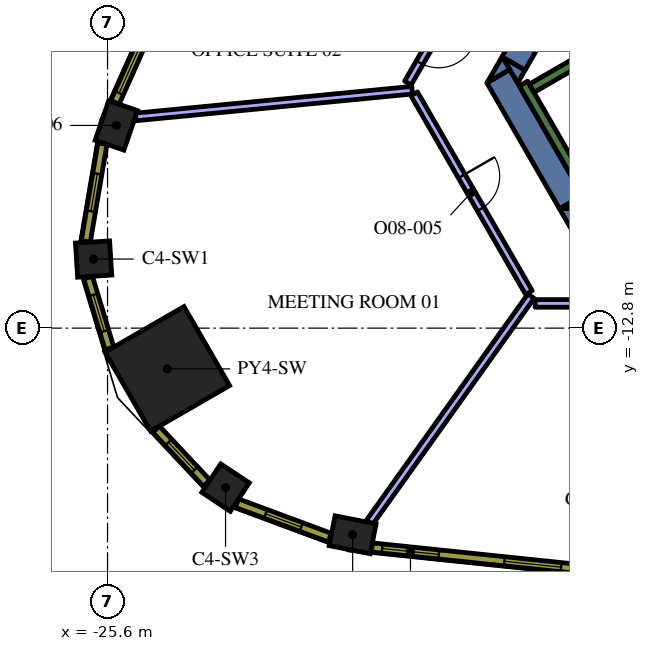
"""IFC4 building model, lengths in metres.
Left out: names, types, materials, properties, quantities, classifications, styles, units other than length and angle.
Written with IfcOpenShell. Run it as: python <this file> out.ifc"""

import sys

from ifc_helpers import new_model, si_unit, direction, frame, frame_2d, origin, origin_2d, place, context, subcontext, project, spatial, polyline, rectangle, outline, extrude, element, fill, save


model = new_model("IFC4")
c1 = context("Model", 3, precision=1e-05, world=origin(), true_north=direction((0.0, 1.0)))
c2 = subcontext(c1, "Body", "Model", "MODEL_VIEW")
j1 = project(units=[si_unit("LENGTHUNIT", "METRE"), si_unit("PLANEANGLEUNIT", "RADIAN")], contexts=[c1])
p1 = place(None, origin())
s1 = spatial("IfcSite", under=j1, at=p1, CompositionType="ELEMENT")
p2 = place(p1, origin())
s2 = spatial("IfcBuilding", under=s1, at=p2, CompositionType="ELEMENT")
p3 = place(p2, frame((0.0, 0.0, 226.8)))
s3 = spatial("IfcBuildingStorey", under=s2, at=p3, CompositionType="ELEMENT", Elevation=226.8)
p4 = place(p3, frame((-24.027, -13.872, 0.0), z_axis=(0.0, 0.0, 1.0), x_axis=(-0.866025403784, -0.5, 0.0)))
e1 = element("IfcColumn", 1, at=p4, inside=s3, PredefinedType="COLUMN", context=c2, shape_type="SweptSolid", body=[
    extrude(rectangle(XDim=2.4, YDim=2.4, at=origin_2d()), origin(), (0.0, 0.0, 1.0), 4.2),
])
for number, where, z_axis, x_axis in (
    (2, (-19.15, -18.237, 0.0), (0.0, 0.0, 1.0), (0.981, -0.192, 0.0)),
    (3, (-25.369, -7.466, 0.0), (0.0, 0.0, 1.0), (-0.324, -0.946, 0.0)),
):
    element("IfcColumn", number, at=place(p3, frame(where, z_axis=z_axis, x_axis=x_axis)), inside=s3, PredefinedType="COLUMN", context=c2, shape_type="SweptSolid", body=[
        extrude(rectangle(XDim=1.1, YDim=0.8, at=origin_2d()), origin(), (0.0, 0.0, 1.0), 4.2),
    ])
for number, where, z_axis, x_axis in (
    (4, (-25.967, -10.982, 0.0), (0.0, 0.0, 1.0), (0.062, -0.998, 0.0)),
    (5, (-22.494, -16.997, 0.0), (0.0, 0.0, 1.0), (0.833, -0.553, 0.0)),
):
    element("IfcColumn", number, at=place(p3, frame(where, z_axis=z_axis, x_axis=x_axis)), inside=s3, PredefinedType="COLUMN", context=c2, shape_type="SweptSolid", body=[
        extrude(rectangle(XDim=0.9, YDim=0.9, at=origin_2d()), origin(), (0.0, 0.0, 1.0), 4.2),
    ])
p5 = place(p3, origin())
e6 = element("IfcWall", 6, at=p5, inside=s3, PredefinedType="SOLIDWALL", context=c2, shape_type="SweptSolid", body=[
    extrude(outline(polyline([(-13.712, -9.65), (-13.324, -9.65), (-13.324, -10.322), (-13.712, -9.65)])), origin(), (0.0, 0.0, 1.0), 4.2),
])
p6 = place(p3, frame((-13.402, -9.487, 0.0), z_axis=(0.0, 0.0, 1.0), x_axis=(-0.500020498207, 0.866013568815, 0.0)))
e7 = element("IfcWall", 7, at=p6, inside=s3, PredefinedType="SOLIDWALL", context=c2, shape_type="SweptSolid", body=[
    extrude(rectangle(XDim=3.829, YDim=0.7, at=frame_2d((1.915, 0.0))), origin(), (0.0, 0.0, 1.0), 4.2),
])
e8 = element("IfcWall", 8, at=p5, inside=s3, PredefinedType="SOLIDWALL", context=c2, shape_type="SweptSolid", body=[
    extrude(outline(polyline([(-15.014, -5.995), (-15.611, -6.339), (-15.213, -5.65), (-15.014, -5.995)])), origin(), (0.0, 0.0, 1.0), 4.2),
])
e9 = element("IfcWall", 9, at=p5, inside=s3, PredefinedType="SOLIDWALL", context=c2, shape_type="SweptSolid", body=[
    extrude(outline(polyline([(-12.904, -9.65), (-13.68, -9.65), (-13.098, -9.314), (-12.904, -9.65)])), origin(), (0.0, 0.0, 1.0), 4.2),
])
p7 = place(p3, frame((-13.475, -3.339, 0.0), z_axis=(0.0, 0.0, 1.0), x_axis=(-0.499944726303, -0.866057313716, 0.0)))
e10 = element("IfcWall", 10, at=p7, inside=s3, PredefinedType="SOLIDWALL", context=c2, shape_type="SweptSolid", body=[
    extrude(rectangle(XDim=2.884, YDim=0.7, at=frame_2d((1.442, 0.0))), origin(), (0.0, 0.0, 1.0), 4.2),
])
e11 = element("IfcWall", 11, at=p5, inside=s3, PredefinedType="SOLIDWALL", context=c2, shape_type="SweptSolid", body=[
    extrude(outline(polyline([(-14.809, -6.35), (-15.197, -5.678), (-14.615, -6.014), (-14.809, -6.35)])), origin(), (0.0, 0.0, 1.0), 4.2),
])
p8 = place(p3, frame((-12.84, -9.511, 0.0), z_axis=(0.0, 0.0, 1.0), x_axis=(-0.499997733992, 0.866026712061, 0.0)))
e12 = element("IfcWall", 12, at=p8, inside=s3, PredefinedType="SOLIDWALL", context=c2, shape_type="SweptSolid", body=[
    extrude(rectangle(XDim=3.634, YDim=0.25, at=frame_2d((1.817, 0.0))), origin(), (0.0, 0.0, 1.0), 4.2),
])
p9 = place(p3, frame((-14.44, -6.49, 0.0), z_axis=(0.0, 0.0, 1.0), x_axis=(0.866022966069, 0.500004222222, 0.0)))
e13 = element("IfcWall", 13, at=p9, inside=s3, PredefinedType="SOLIDWALL", context=c2, shape_type="SweptSolid", body=[
    extrude(rectangle(XDim=6.8, YDim=0.25, at=frame_2d((3.4, 0.0))), origin(), (0.0, 0.0, 1.0), 4.2),
])
p10 = place(p3, frame((-17.586, -6.54, 0.0), z_axis=(0.0, 0.0, 1.0), x_axis=(-0.995357542522, -0.096246363795, 0.0)))
e14 = element("IfcWall", 14, at=p10, inside=s3, PredefinedType="PARTITIONING", context=c2, shape_type="SweptSolid", body=[
    extrude(rectangle(XDim=7.318, YDim=0.2, at=frame_2d((3.659, 0.0))), origin(), (0.0, 0.0, 1.0), 3.45),
])
p11 = place(p3, frame((-16.537, -4.343, 0.0), z_axis=(0.0, 0.0, 1.0), x_axis=(-0.500014285048, -0.866017156151, 0.0)))
e15 = element("IfcWall", 15, at=p11, inside=s3, PredefinedType="PARTITIONING", context=c2, shape_type="SweptSolid", body=[
    extrude(rectangle(XDim=2.317, YDim=0.2, at=frame_2d((1.159, 0.0))), origin(), (0.0, 0.0, 1.0), 3.45),
])
p12 = place(p11, frame((0.7, 0.0, 0.0)))
e16 = element("IfcOpeningElement", 16, at=p12, cuts=e15, PredefinedType="OPENING", context=c2, shape_type="SweptSolid", body=[
    extrude(rectangle(XDim=1.0, YDim=2.1, at=frame_2d((0.5, 1.05))), frame((0.0, 0.11, 0.0), z_axis=(0.0, -1.0, 0.0), x_axis=(1.0, 0.0, 0.0)), (0.0, 0.0, 1.0), 0.22),
])
p13 = place(p3, frame((-14.457, -11.96, 0.0), z_axis=(0.0, 0.0, 1.0), x_axis=(-0.581023578026, -0.813886725397, 0.0)))
e17 = element("IfcWall", 17, at=p13, inside=s3, PredefinedType="PARTITIONING", context=c2, shape_type="SweptSolid", body=[
    extrude(rectangle(XDim=7.318, YDim=0.2, at=frame_2d((3.659, 0.0))), origin(), (0.0, 0.0, 1.0), 3.45),
])
p14 = place(p3, frame((-17.531, -6.635, 0.0), z_axis=(0.0, 0.0, 1.0), x_axis=(0.500009459589, -0.866019942219, 0.0)))
e18 = element("IfcWall", 18, at=p14, inside=s3, PredefinedType="PARTITIONING", context=c2, shape_type="SweptSolid", body=[
    extrude(rectangle(XDim=6.038, YDim=0.2, at=frame_2d((3.019, 0.0))), origin(), (0.0, 0.0, 1.0), 3.45),
])
p15 = place(p14, frame((2.5, 0.0, 0.0)))
e19 = element("IfcOpeningElement", 19, at=p15, cuts=e18, PredefinedType="OPENING", context=c2, shape_type="SweptSolid", body=[
    extrude(rectangle(XDim=1.0, YDim=2.1, at=frame_2d((0.5, 1.05))), frame((0.0, 0.11, 0.0), z_axis=(0.0, -1.0, 0.0), x_axis=(1.0, 0.0, 0.0)), (0.0, 0.0, 1.0), 0.22),
])
p16 = place(p3, frame((-14.347, -12.15, 0.0), z_axis=(0.0, 0.0, 1.0), x_axis=(1.0, 0.0, 0.0)))
e20 = element("IfcWall", 20, at=p16, inside=s3, PredefinedType="PARTITIONING", context=c2, shape_type="SweptSolid", body=[
    extrude(rectangle(XDim=9.817, YDim=0.2, at=frame_2d((4.909, 0.0))), origin(), (0.0, 0.0, 1.0), 3.45),
])
p17 = place(p16, frame((4.4, 0.0, 0.0)))
e21 = element("IfcOpeningElement", 21, at=p17, cuts=e20, PredefinedType="OPENING", context=c2, shape_type="SweptSolid", body=[
    extrude(rectangle(XDim=1.0, YDim=2.1, at=frame_2d((0.5, 1.05))), frame((0.0, 0.11, 0.0), z_axis=(0.0, -1.0, 0.0), x_axis=(1.0, 0.0, 0.0)), (0.0, 0.0, 1.0), 0.22),
])
p18 = place(p3, frame((-18.644, -18.571, 0.0), z_axis=(0.0, 0.0, 1.0), x_axis=(0.994621961215, -0.103571976272, 0.0)))
e22 = element("IfcWall", 22, at=p18, inside=s3, PredefinedType="SOLIDWALL", context=c2, shape_type="SweptSolid", body=[
    extrude(rectangle(XDim=5.311, YDim=0.24, at=frame_2d((2.655, 0.0))), origin(), (0.0, 0.0, 1.0), 3.95),
])
p19 = place(p18, frame((0.271, 0.0, 0.9)))
e23 = element("IfcOpeningElement", 23, at=p19, cuts=e22, PredefinedType="OPENING", context=c2, shape_type="SweptSolid", body=[
    extrude(rectangle(XDim=1.5, YDim=2.55, at=frame_2d((0.75, 1.275))), frame((0.0, 0.13, 0.0), z_axis=(0.0, -1.0, 0.0), x_axis=(1.0, 0.0, 0.0)), (0.0, 0.0, 1.0), 0.26),
])
p20 = place(p18, frame((3.504, 0.0, 0.9)))
e24 = element("IfcOpeningElement", 24, at=p20, cuts=e22, PredefinedType="OPENING", context=c2, shape_type="SweptSolid", body=[
    extrude(rectangle(XDim=1.5, YDim=2.55, at=frame_2d((0.75, 1.275))), frame((0.0, 0.13, 0.0), z_axis=(0.0, -1.0, 0.0), x_axis=(1.0, 0.0, 0.0)), (0.0, 0.0, 1.0), 0.26),
])
p21 = place(p3, frame((-23.24, -2.011, 0.0), z_axis=(0.0, 0.0, 1.0), x_axis=(-0.407579651789, -0.913169659728, 0.0)))
e25 = element("IfcWall", 25, at=p21, inside=s3, PredefinedType="SOLIDWALL", context=c2, shape_type="SweptSolid", body=[
    extrude(rectangle(XDim=5.311, YDim=0.24, at=frame_2d((2.655, 0.0))), origin(), (0.0, 0.0, 1.0), 3.95),
])
p22 = place(p21, frame((0.306, 0.0, 0.9)))
e26 = element("IfcOpeningElement", 26, at=p22, cuts=e25, PredefinedType="OPENING", context=c2, shape_type="SweptSolid", body=[
    extrude(rectangle(XDim=1.5, YDim=2.55, at=frame_2d((0.75, 1.275))), frame((0.0, 0.13, 0.0), z_axis=(0.0, -1.0, 0.0), x_axis=(1.0, 0.0, 0.0)), (0.0, 0.0, 1.0), 0.26),
])
p23 = place(p21, frame((3.539, 0.0, 0.9)))
e27 = element("IfcOpeningElement", 27, at=p23, cuts=e25, PredefinedType="OPENING", context=c2, shape_type="SweptSolid", body=[
    extrude(rectangle(XDim=1.5, YDim=2.55, at=frame_2d((0.75, 1.275))), frame((0.0, 0.13, 0.0), z_axis=(0.0, -1.0, 0.0), x_axis=(1.0, 0.0, 0.0)), (0.0, 0.0, 1.0), 0.26),
])
p24 = place(p3, frame((-25.734, -7.945, 0.0), z_axis=(0.0, 0.0, 1.0), x_axis=(-0.167660055546, -0.985844869021, 0.0)))
e28 = element("IfcWall", 28, at=p24, inside=s3, PredefinedType="SOLIDWALL", context=c2, shape_type="SweptSolid", body=[
    extrude(rectangle(XDim=2.609, YDim=0.24, at=frame_2d((1.305, 0.0))), origin(), (0.0, 0.0, 1.0), 3.95),
])
p25 = place(p24, frame((0.805, 0.0, 0.9)))
e29 = element("IfcOpeningElement", 29, at=p25, cuts=e28, PredefinedType="OPENING", context=c2, shape_type="SweptSolid", body=[
    extrude(rectangle(XDim=1.0, YDim=2.55, at=frame_2d((0.5, 1.275))), frame((0.0, 0.13, 0.0), z_axis=(0.0, -1.0, 0.0), x_axis=(1.0, 0.0, 0.0)), (0.0, 0.0, 1.0), 0.26),
])
p26 = place(p3, frame((-26.112, -11.469, 0.0), z_axis=(0.0, 0.0, 1.0), x_axis=(0.288727209095, -0.957411405159, 0.0)))
e30 = element("IfcWall", 30, at=p26, inside=s3, PredefinedType="SOLIDWALL", context=c2, shape_type="SweptSolid", body=[
    extrude(rectangle(XDim=1.948, YDim=0.24, at=frame_2d((0.974, 0.0))), origin(), (0.0, 0.0, 1.0), 3.95),
])
p27 = place(p26, frame((0.474, 0.0, 0.9)))
e31 = element("IfcOpeningElement", 31, at=p27, cuts=e30, PredefinedType="OPENING", context=c2, shape_type="SweptSolid", body=[
    extrude(rectangle(XDim=1.0, YDim=2.55, at=frame_2d((0.5, 1.275))), frame((0.0, 0.13, 0.0), z_axis=(0.0, -1.0, 0.0), x_axis=(1.0, 0.0, 0.0)), (0.0, 0.0, 1.0), 0.26),
])
p28 = place(p3, frame((-24.323, -15.459, 0.0), z_axis=(0.0, 0.0, 1.0), x_axis=(0.684770274166, -0.728758994194, 0.0)))
e32 = element("IfcWall", 32, at=p28, inside=s3, PredefinedType="SOLIDWALL", context=c2, shape_type="SweptSolid", body=[
    extrude(rectangle(XDim=1.948, YDim=0.24, at=frame_2d((0.974, 0.0))), origin(), (0.0, 0.0, 1.0), 3.95),
])
p29 = place(p28, frame((0.474, 0.0, 0.9)))
e33 = element("IfcOpeningElement", 33, at=p29, cuts=e32, PredefinedType="OPENING", context=c2, shape_type="SweptSolid", body=[
    extrude(rectangle(XDim=1.0, YDim=2.55, at=frame_2d((0.5, 1.275))), frame((0.0, 0.13, 0.0), z_axis=(0.0, -1.0, 0.0), x_axis=(1.0, 0.0, 0.0)), (0.0, 0.0, 1.0), 0.26),
])
p30 = place(p3, frame((-22.194, -17.406, 0.0), z_axis=(0.0, 0.0, 1.0), x_axis=(0.937569171184, -0.347798863203, 0.0)))
e34 = element("IfcWall", 34, at=p30, inside=s3, PredefinedType="SOLIDWALL", context=c2, shape_type="SweptSolid", body=[
    extrude(rectangle(XDim=2.609, YDim=0.24, at=frame_2d((1.305, 0.0))), origin(), (0.0, 0.0, 1.0), 3.95),
])
p31 = place(p30, frame((0.805, 0.0, 0.9)))
e35 = element("IfcOpeningElement", 35, at=p31, cuts=e34, PredefinedType="OPENING", context=c2, shape_type="SweptSolid", body=[
    extrude(rectangle(XDim=1.0, YDim=2.55, at=frame_2d((0.5, 1.275))), frame((0.0, 0.13, 0.0), z_axis=(0.0, -1.0, 0.0), x_axis=(1.0, 0.0, 0.0)), (0.0, 0.0, 1.0), 0.26),
])
p32 = place(p12, origin())
e36 = element("IfcDoor", 36, at=p32, inside=s3, OperationType="SINGLE_SWING_RIGHT", PredefinedType="DOOR", context=c2, shape_type="SweptSolid", body=[
    extrude(rectangle(XDim=1.0, YDim=2.1, at=frame_2d((0.5, 1.05))), frame((0.0, 0.025, 0.0), z_axis=(0.0, -1.0, 0.0), x_axis=(1.0, 0.0, 0.0)), (0.0, 0.0, 1.0), 0.05),
])
fill(e16, e36)
p33 = place(p15, origin())
e37 = element("IfcDoor", 37, at=p33, inside=s3, OperationType="SINGLE_SWING_LEFT", PredefinedType="DOOR", context=c2, shape_type="SweptSolid", body=[
    extrude(rectangle(XDim=1.0, YDim=2.1, at=frame_2d((0.5, 1.05))), frame((0.0, 0.025, 0.0), z_axis=(0.0, -1.0, 0.0), x_axis=(1.0, 0.0, 0.0)), (0.0, 0.0, 1.0), 0.05),
])
fill(e19, e37)
p34 = place(p19, origin())
e38 = element("IfcWindow", 38, at=p34, inside=s3, PartitioningType="SINGLE_PANEL", PredefinedType="WINDOW", context=c2, shape_type="SweptSolid", body=[
    extrude(rectangle(XDim=1.5, YDim=2.55, at=frame_2d((0.75, 1.275))), frame((0.0, 0.04, 0.0), z_axis=(0.0, -1.0, 0.0), x_axis=(1.0, 0.0, 0.0)), (0.0, 0.0, 1.0), 0.06),
])
fill(e23, e38)
p35 = place(p20, origin())
e39 = element("IfcWindow", 39, at=p35, inside=s3, PartitioningType="SINGLE_PANEL", PredefinedType="WINDOW", context=c2, shape_type="SweptSolid", body=[
    extrude(rectangle(XDim=1.5, YDim=2.55, at=frame_2d((0.75, 1.275))), frame((0.0, 0.04, 0.0), z_axis=(0.0, -1.0, 0.0), x_axis=(1.0, 0.0, 0.0)), (0.0, 0.0, 1.0), 0.06),
])
fill(e24, e39)
p36 = place(p23, origin())
e40 = element("IfcWindow", 40, at=p36, inside=s3, PartitioningType="SINGLE_PANEL", PredefinedType="WINDOW", context=c2, shape_type="SweptSolid", body=[
    extrude(rectangle(XDim=1.5, YDim=2.55, at=frame_2d((0.75, 1.275))), frame((0.0, 0.04, 0.0), z_axis=(0.0, -1.0, 0.0), x_axis=(1.0, 0.0, 0.0)), (0.0, 0.0, 1.0), 0.06),
])
fill(e27, e40)
p37 = place(p25, origin())
e41 = element("IfcWindow", 41, at=p37, inside=s3, PartitioningType="SINGLE_PANEL", PredefinedType="WINDOW", context=c2, shape_type="SweptSolid", body=[
    extrude(rectangle(XDim=1.0, YDim=2.55, at=frame_2d((0.5, 1.275))), frame((0.0, 0.04, 0.0), z_axis=(0.0, -1.0, 0.0), x_axis=(1.0, 0.0, 0.0)), (0.0, 0.0, 1.0), 0.06),
])
fill(e29, e41)
p38 = place(p27, origin())
e42 = element("IfcWindow", 42, at=p38, inside=s3, PartitioningType="SINGLE_PANEL", PredefinedType="WINDOW", context=c2, shape_type="SweptSolid", body=[
    extrude(rectangle(XDim=1.0, YDim=2.55, at=frame_2d((0.5, 1.275))), frame((0.0, 0.04, 0.0), z_axis=(0.0, -1.0, 0.0), x_axis=(1.0, 0.0, 0.0)), (0.0, 0.0, 1.0), 0.06),
])
fill(e31, e42)
p39 = place(p29, origin())
e43 = element("IfcWindow", 43, at=p39, inside=s3, PartitioningType="SINGLE_PANEL", PredefinedType="WINDOW", context=c2, shape_type="SweptSolid", body=[
    extrude(rectangle(XDim=1.0, YDim=2.55, at=frame_2d((0.5, 1.275))), frame((0.0, 0.04, 0.0), z_axis=(0.0, -1.0, 0.0), x_axis=(1.0, 0.0, 0.0)), (0.0, 0.0, 1.0), 0.06),
])
fill(e33, e43)
p40 = place(p31, origin())
e44 = element("IfcWindow", 44, at=p40, inside=s3, PartitioningType="SINGLE_PANEL", PredefinedType="WINDOW", context=c2, shape_type="SweptSolid", body=[
    extrude(rectangle(XDim=1.0, YDim=2.55, at=frame_2d((0.5, 1.275))), frame((0.0, 0.04, 0.0), z_axis=(0.0, -1.0, 0.0), x_axis=(1.0, 0.0, 0.0)), (0.0, 0.0, 1.0), 0.06),
])
fill(e35, e44)
save(model, sys.argv[1])
